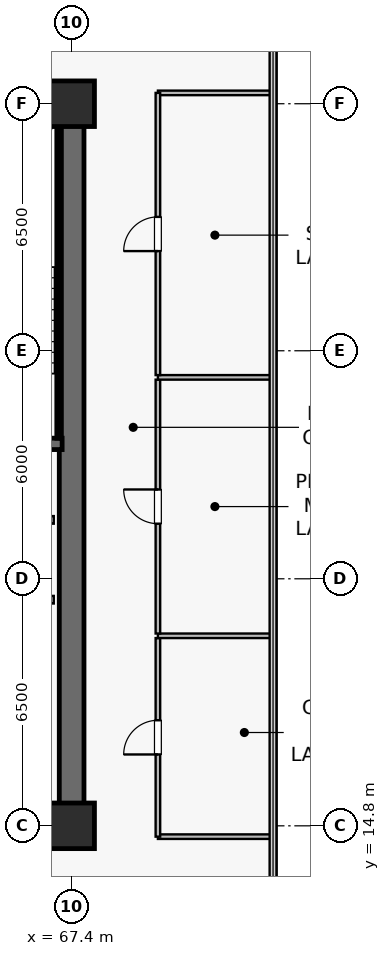
"""IFC4 building model, lengths in metres.
Left out: names, types, materials, properties, quantities, classifications, styles, units other than length and angle.
Written with IfcOpenShell. Run it as: python <this file> out.ifc"""

import sys

from ifc_helpers import new_model, si_unit, direction, frame, frame_2d, origin, origin_2d, place, context, subcontext, project, spatial, rectangle, extrude, source, transform, mapped, element, fill, save


model = new_model("IFC4")
c1 = context("Model", 3, precision=1e-05, world=origin(), true_north=direction((0.0, 1.0)))
c2 = subcontext(c1, "Body", "Model", "MODEL_VIEW")
j1 = project(units=[si_unit("LENGTHUNIT", "METRE"), si_unit("PLANEANGLEUNIT", "RADIAN")], contexts=[c1])
p1 = place(None, origin())
s1 = spatial("IfcSite", under=j1, at=p1, CompositionType="ELEMENT")
p2 = place(p1, origin())
s2 = spatial("IfcBuilding", under=s1, at=p2, CompositionType="ELEMENT")
p3 = place(p2, frame((0.0, 0.0, 146.1)))
s3 = spatial("IfcBuildingStorey", under=s2, at=p3, CompositionType="ELEMENT", Elevation=146.1)
p4 = place(p3, frame((52.275, 14.8, 0.0), z_axis=(0.0, 0.0, 1.0), x_axis=(1.0, 0.0, 0.0)))
e1 = element("IfcWall", 1, at=p4, inside=s3, PredefinedType="SHEAR", context=c2, shape_type="SweptSolid", body=[
    extrude(rectangle(XDim=15.45, YDim=0.65, at=frame_2d((7.725, 0.0))), origin(), (0.0, 0.0, 1.0), 3.79),
])
p5 = place(p3, frame((52.275, 33.8, 0.0), z_axis=(0.0, 0.0, 1.0), x_axis=(1.0, 0.0, 0.0)))
e2 = element("IfcWall", 2, at=p5, inside=s3, PredefinedType="SHEAR", context=c2, shape_type="SweptSolid", body=[
    extrude(rectangle(XDim=15.45, YDim=0.65, at=frame_2d((7.725, 0.0))), origin(), (0.0, 0.0, 1.0), 3.79),
])
p6 = place(p5, frame((7.675, 0.0, 0.0)))
e3 = element("IfcOpeningElement", 3, at=p6, cuts=e2, PredefinedType="OPENING", context=c2, shape_type="SweptSolid", body=[
    extrude(rectangle(XDim=0.95, YDim=2.15, at=frame_2d((0.475, 1.075))), frame((0.0, 0.335, 0.0), z_axis=(0.0, -1.0, 0.0), x_axis=(1.0, 0.0, 0.0)), (0.0, 0.0, 1.0), 0.67),
])
p7 = place(p5, frame((2.61, 0.0, 0.0)))
e4 = element("IfcOpeningElement", 4, at=p7, cuts=e2, PredefinedType="OPENING", context=c2, shape_type="SweptSolid", body=[
    extrude(rectangle(XDim=0.95, YDim=2.15, at=frame_2d((0.475, 1.075))), frame((0.0, 0.335, 0.0), z_axis=(0.0, -1.0, 0.0), x_axis=(1.0, 0.0, 0.0)), (0.0, 0.0, 1.0), 0.67),
])
p8 = place(p3, frame((67.4, 15.125, 0.0), z_axis=(0.0, 0.0, 1.0), x_axis=(0.0, 1.0, 0.0)))
e5 = element("IfcWall", 5, at=p8, inside=s3, PredefinedType="SHEAR", context=c2, shape_type="SweptSolid", body=[
    extrude(rectangle(XDim=18.35, YDim=0.65, at=frame_2d((9.175, 0.0))), origin(), (0.0, 0.0, 1.0), 3.79),
])
p9 = place(p3, frame((63.35, 24.85, 0.0), z_axis=(0.0, 0.0, 1.0), x_axis=(1.0, 0.0, 0.0)))
e6 = element("IfcWall", 6, at=p9, inside=s3, PredefinedType="SHEAR", context=c2, shape_type="SweptSolid", body=[
    extrude(rectangle(XDim=3.8, YDim=0.3, at=frame_2d((1.9, 0.0))), origin(), (0.0, 0.0, 1.0), 3.79),
])
p10 = place(p3, frame((63.35, 33.4, 0.0), z_axis=(0.0, 0.0, 1.0), x_axis=(1.0, 0.0, 0.0)))
e7 = element("IfcWall", 7, at=p10, inside=s3, PredefinedType="SOLIDWALL", context=c2, shape_type="SweptSolid", body=[
    extrude(rectangle(XDim=3.72, YDim=0.12, at=frame_2d((1.86, 0.0))), origin(), (0.0, 0.0, 1.0), 3.79),
])
p11 = place(p3, frame((67.07, 25.0, 0.0), z_axis=(0.0, 0.0, 1.0), x_axis=(0.0, 1.0, 0.0)))
e8 = element("IfcWall", 8, at=p11, inside=s3, PredefinedType="SOLIDWALL", context=c2, shape_type="SweptSolid", body=[
    extrude(rectangle(XDim=8.32, YDim=0.12, at=frame_2d((4.16, 0.0))), origin(), (0.0, 0.0, 1.0), 3.79),
])
m1 = source(origin(), c2, "Body", "SweptSolid", [
    extrude(rectangle(XDim=1.2, YDim=1.2, at=origin_2d()), origin(), (0.0, 0.0, 1.0), 4.1),
])
for number, where, z_axis, x_axis in (
    (9, (67.4, 14.8, 0.0), (0.0, 0.0, 1.0), (1.0, 0.0, 0.0)),
    (10, (67.4, 33.8, 0.0), (0.0, 0.0, 1.0), (1.0, 0.0, 0.0)),
):
    element("IfcColumn", number, at=place(p3, frame(where, z_axis=z_axis, x_axis=x_axis)), inside=s3, PredefinedType="COLUMN", context=c2, shape_type="MappedRepresentation", body=[
        mapped(m1, transform((0.0, 0.0, 0.0), scale=1.0)),
    ])
for number, where, z_axis, x_axis in (
    (11, (64.67, 20.75, 0.0), (0.0, 0.0, 1.0), (1.0, 0.0, 0.0)),
    (12, (64.67, 22.85, 0.0), (0.0, 0.0, 1.0), (1.0, 0.0, 0.0)),
):
    element("IfcWall", number, at=place(p3, frame(where, z_axis=z_axis, x_axis=x_axis)), inside=s3, PredefinedType="SOLIDWALL", context=c2, shape_type="SweptSolid", body=[
        extrude(rectangle(XDim=2.26, YDim=0.2, at=frame_2d((1.13, 0.0))), origin(), (0.0, 0.0, 1.0), 3.79),
    ])
for number, where, z_axis, x_axis in (
    (13, (69.67, 14.515, 0.0), (0.0, 0.0, 1.0), (1.0, 0.0, 0.0)),
    (14, (69.67, 34.085, 0.0), (0.0, 0.0, 1.0), (1.0, 0.0, 0.0)),
):
    element("IfcWall", number, at=place(p3, frame(where, z_axis=z_axis, x_axis=x_axis)), inside=s3, PredefinedType="PARTITIONING", context=c2, shape_type="SweptSolid", body=[
        extrude(rectangle(XDim=3.02, YDim=0.12, at=frame_2d((1.51, 0.0))), origin(), (0.0, 0.0, 1.0), 3.79),
    ])
p12 = place(p3, frame((69.67, 14.515, 0.0), z_axis=(0.0, 0.0, 1.0), x_axis=(0.0, 1.0, 0.0)))
e15 = element("IfcWall", 15, at=p12, inside=s3, PredefinedType="PARTITIONING", context=c2, shape_type="SweptSolid", body=[
    extrude(rectangle(XDim=5.225, YDim=0.12, at=frame_2d((2.613, 0.0))), origin(), (0.0, 0.0, 1.0), 3.79),
])
p13 = place(p12, frame((2.163, 0.0, 0.0)))
e16 = element("IfcOpeningElement", 16, at=p13, cuts=e15, PredefinedType="OPENING", context=c2, shape_type="SweptSolid", body=[
    extrude(rectangle(XDim=0.9, YDim=2.1, at=frame_2d((0.45, 1.05))), frame((0.0, 0.07, 0.0), z_axis=(0.0, -1.0, 0.0), x_axis=(1.0, 0.0, 0.0)), (0.0, 0.0, 1.0), 0.14),
])
p14 = place(p3, frame((69.67, 19.8, 0.0), z_axis=(0.0, 0.0, 1.0), x_axis=(1.0, 0.0, 0.0)))
e17 = element("IfcWall", 17, at=p14, inside=s3, PredefinedType="PARTITIONING", context=c2, shape_type="SweptSolid", body=[
    extrude(rectangle(XDim=3.02, YDim=0.12, at=frame_2d((1.51, 0.0))), origin(), (0.0, 0.0, 1.0), 3.79),
])
p15 = place(p3, frame((69.67, 19.86, 0.0), z_axis=(0.0, 0.0, 1.0), x_axis=(0.0, 1.0, 0.0)))
e18 = element("IfcWall", 18, at=p15, inside=s3, PredefinedType="PARTITIONING", context=c2, shape_type="SweptSolid", body=[
    extrude(rectangle(XDim=6.68, YDim=0.12, at=frame_2d((3.34, 0.0))), origin(), (0.0, 0.0, 1.0), 3.79),
])
p16 = place(p15, frame((2.89, 0.0, 0.0)))
e19 = element("IfcOpeningElement", 19, at=p16, cuts=e18, PredefinedType="OPENING", context=c2, shape_type="SweptSolid", body=[
    extrude(rectangle(XDim=0.9, YDim=2.1, at=frame_2d((0.45, 1.05))), frame((0.0, 0.07, 0.0), z_axis=(0.0, -1.0, 0.0), x_axis=(1.0, 0.0, 0.0)), (0.0, 0.0, 1.0), 0.14),
])
p17 = place(p3, frame((69.67, 26.6, 0.0), z_axis=(0.0, 0.0, 1.0), x_axis=(1.0, 0.0, 0.0)))
e20 = element("IfcWall", 20, at=p17, inside=s3, PredefinedType="PARTITIONING", context=c2, shape_type="SweptSolid", body=[
    extrude(rectangle(XDim=3.02, YDim=0.12, at=frame_2d((1.51, 0.0))), origin(), (0.0, 0.0, 1.0), 3.79),
])
p18 = place(p3, frame((69.67, 26.66, 0.0), z_axis=(0.0, 0.0, 1.0), x_axis=(0.0, 1.0, 0.0)))
e21 = element("IfcWall", 21, at=p18, inside=s3, PredefinedType="PARTITIONING", context=c2, shape_type="SweptSolid", body=[
    extrude(rectangle(XDim=7.425, YDim=0.12, at=frame_2d((3.712, 0.0))), origin(), (0.0, 0.0, 1.0), 3.79),
])
p19 = place(p18, frame((3.262, 0.0, 0.0)))
e22 = element("IfcOpeningElement", 22, at=p19, cuts=e21, PredefinedType="OPENING", context=c2, shape_type="SweptSolid", body=[
    extrude(rectangle(XDim=0.9, YDim=2.1, at=frame_2d((0.45, 1.05))), frame((0.0, 0.07, 0.0), z_axis=(0.0, -1.0, 0.0), x_axis=(1.0, 0.0, 0.0)), (0.0, 0.0, 1.0), 0.14),
])
m2 = source(origin(), c2, "Body", "SweptSolid", [
    extrude(rectangle(XDim=0.9, YDim=2.1, at=frame_2d((0.45, 1.05))), frame((0.0, 0.025, 0.0), z_axis=(0.0, -1.0, 0.0), x_axis=(1.0, 0.0, 0.0)), (0.0, 0.0, 1.0), 0.05),
])
p20 = place(p13, origin())
e23 = element("IfcDoor", 23, at=p20, inside=s3, OperationType="SINGLE_SWING_LEFT", PredefinedType="DOOR", context=c2, shape_type="MappedRepresentation", body=[
    mapped(m2, transform((0.0, 0.0, 0.0), scale=1.0)),
])
fill(e16, e23)
p21 = place(p16, origin())
e24 = element("IfcDoor", 24, at=p21, inside=s3, OperationType="SINGLE_SWING_RIGHT", PredefinedType="DOOR", context=c2, shape_type="MappedRepresentation", body=[
    mapped(m2, transform((0.0, 0.0, 0.0), scale=1.0)),
])
fill(e19, e24)
p22 = place(p19, origin())
e25 = element("IfcDoor", 25, at=p22, inside=s3, OperationType="SINGLE_SWING_LEFT", PredefinedType="DOOR", context=c2, shape_type="MappedRepresentation", body=[
    mapped(m2, transform((0.0, 0.0, 0.0), scale=1.0)),
])
fill(e22, e25)
save(model, sys.argv[1])
